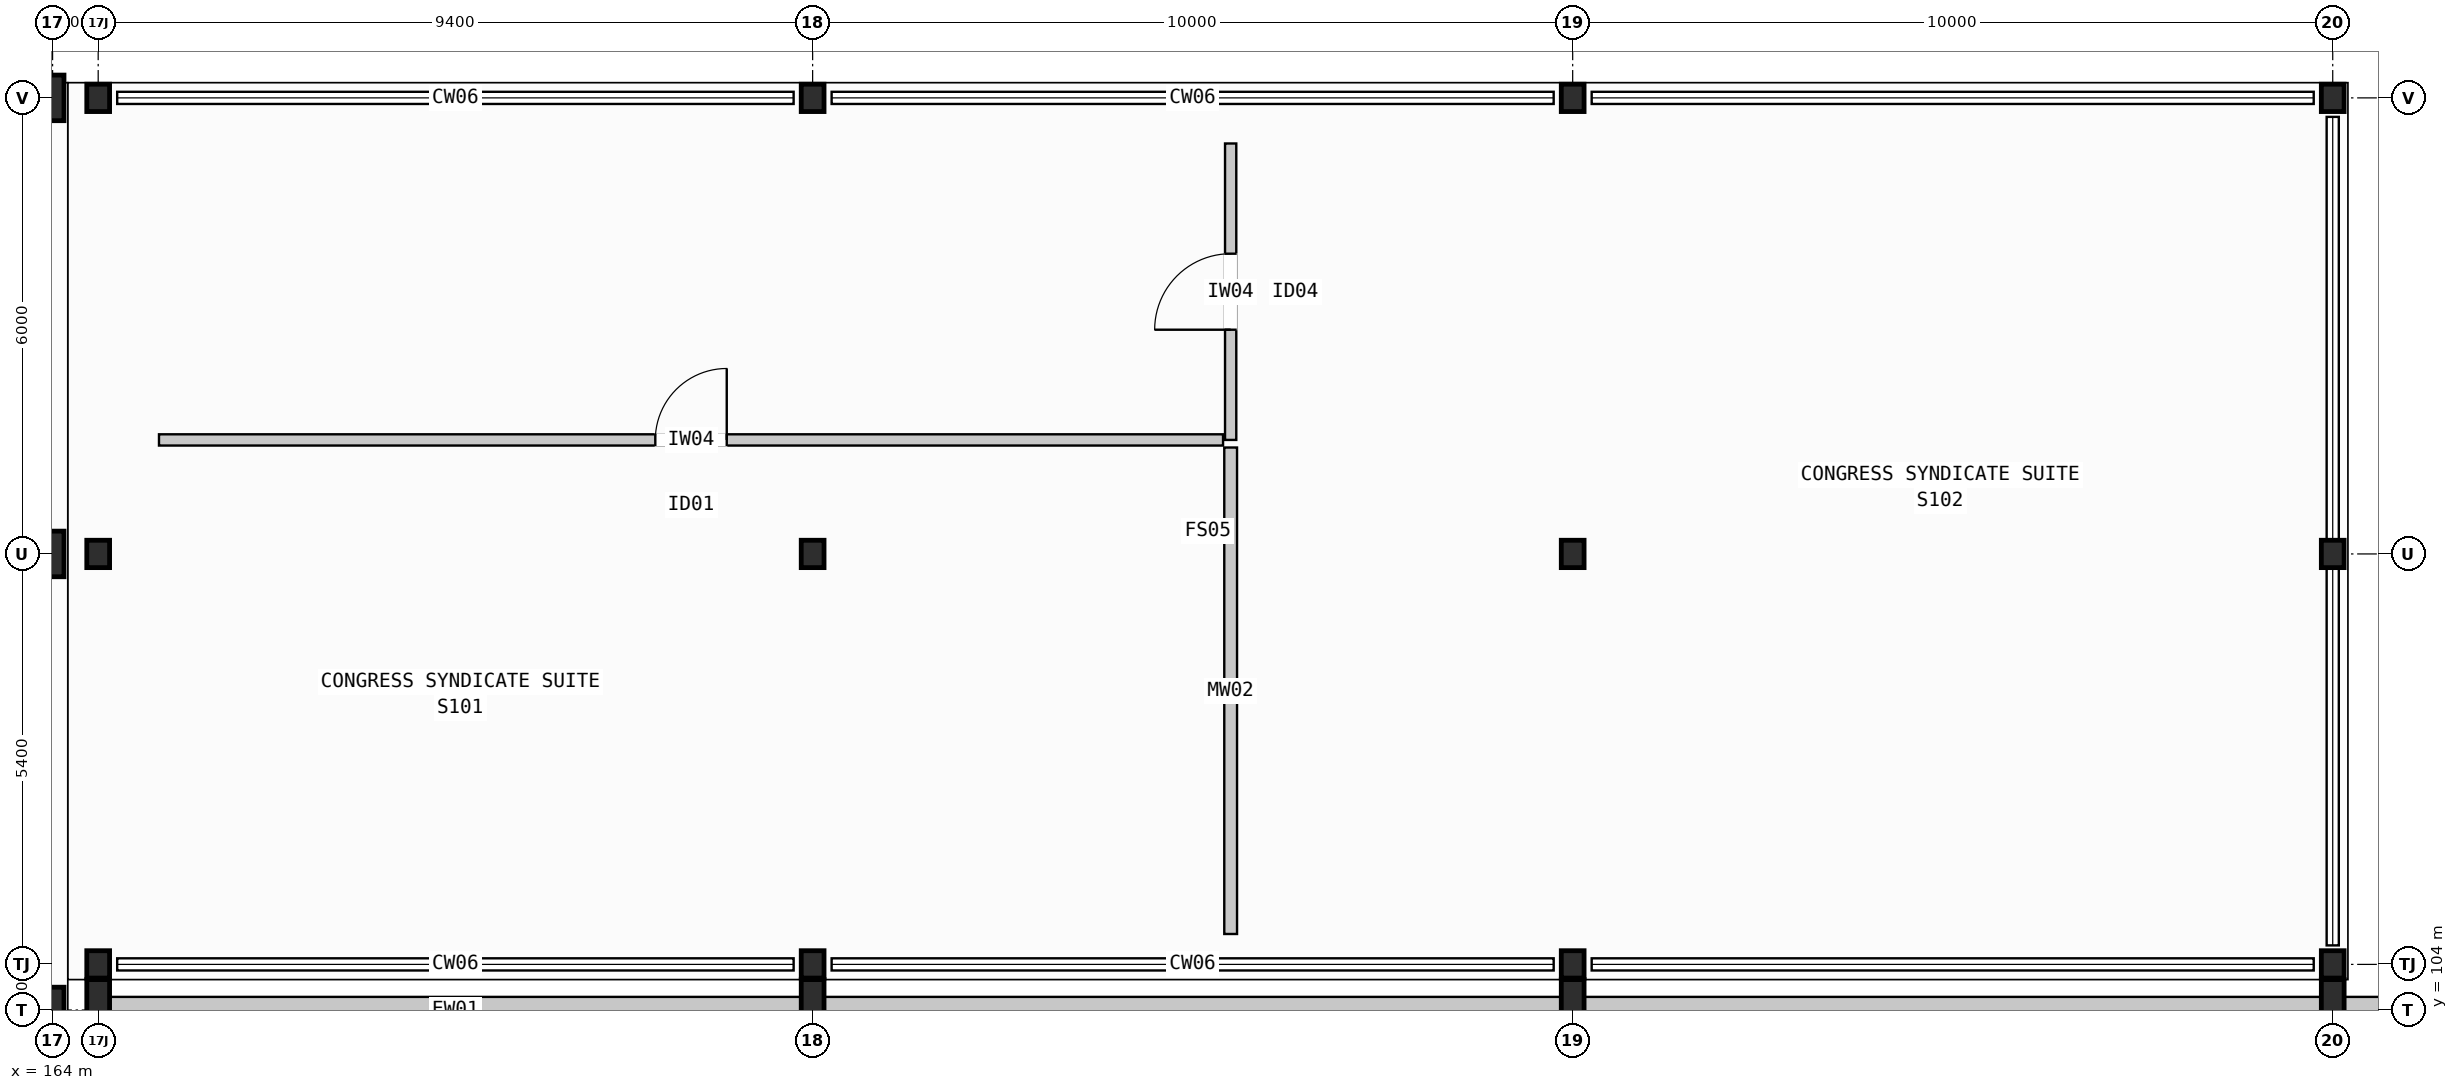
"""IFC4 building model, lengths in metres.
Left out: names, types, materials, properties, quantities, classifications, styles, units other than length and angle.
Written with IfcOpenShell. Run it as: python <this file> out.ifc"""

import sys

from ifc_helpers import new_model, si_unit, direction, frame, frame_2d, origin, origin_2d, place, context, subcontext, project, spatial, rectangle, i_section, extrude, element, fill, save


model = new_model("IFC4")
c1 = context("Model", 3, precision=1e-05, world=origin(), true_north=direction((0.0, 1.0)))
c2 = subcontext(c1, "Body", "Model", "MODEL_VIEW")
j1 = project(units=[si_unit("LENGTHUNIT", "METRE"), si_unit("PLANEANGLEUNIT", "RADIAN")], contexts=[c1])
p1 = place(None, origin())
s1 = spatial("IfcSite", under=j1, at=p1, CompositionType="ELEMENT")
p2 = place(p1, origin())
s2 = spatial("IfcBuilding", under=s1, at=p2, CompositionType="ELEMENT")
p3 = place(p2, frame((0.0, 0.0, 6.0)))
s3 = spatial("IfcBuildingStorey", under=s2, at=p3, CompositionType="ELEMENT", Elevation=6.0)
for number, where, z_axis, x_axis in (
    (1, (164.0, 104.0, 0.0), (0.0, 0.0, 1.0), (1.0, 0.0, 0.0)),
    (2, (164.0, 110.0, 0.0), (0.0, 0.0, 1.0), (1.0, 0.0, 0.0)),
    (3, (164.0, 116.0, 0.0), (0.0, 0.0, 1.0), (1.0, 0.0, 0.0)),
):
    element("IfcColumn", number, at=place(p3, frame(where, z_axis=z_axis, x_axis=x_axis)), inside=s3, PredefinedType="COLUMN", context=c2, shape_type="SweptSolid", body=[
        extrude(i_section(OverallWidth=0.3, OverallDepth=0.6, WebThickness=0.015, FlangeThickness=0.03, FilletRadius=0.027, at=origin_2d()), origin(), (0.0, 0.0, 1.0), 5.4),
    ])
p4 = place(p3, frame((164.6, 104.0, 0.0), z_axis=(0.0, 0.0, 1.0), x_axis=(1.0, 0.0, 0.0)))
e4 = element("IfcColumn", 4, at=p4, inside=s3, PredefinedType="COLUMN", context=c2, shape_type="SweptSolid", body=[
    extrude(i_section(OverallWidth=0.3, OverallDepth=0.8, WebThickness=0.018, FlangeThickness=0.033, FilletRadius=0.03, at=origin_2d()), origin(), (0.0, 0.0, 1.0), 5.4),
])
for number, where, z_axis, x_axis in (
    (5, (164.6, 104.6, 0.0), (0.0, 0.0, 1.0), (1.0, 0.0, 0.0)),
    (6, (164.6, 110.0, 0.0), (0.0, 0.0, 1.0), (1.0, 0.0, 0.0)),
    (7, (164.6, 116.0, 0.0), (0.0, 0.0, 1.0), (1.0, 0.0, 0.0)),
):
    element("IfcColumn", number, at=place(p3, frame(where, z_axis=z_axis, x_axis=x_axis)), inside=s3, PredefinedType="COLUMN", context=c2, shape_type="SweptSolid", body=[
        extrude(i_section(OverallWidth=0.3, OverallDepth=0.36, WebThickness=0.012, FlangeThickness=0.022, FilletRadius=0.027, at=origin_2d()), origin(), (0.0, 0.0, 1.0), 5.4),
    ])
p5 = place(p3, frame((174.0, 104.0, 0.0), z_axis=(0.0, 0.0, 1.0), x_axis=(1.0, 0.0, 0.0)))
e8 = element("IfcColumn", 8, at=p5, inside=s3, PredefinedType="COLUMN", context=c2, shape_type="SweptSolid", body=[
    extrude(i_section(OverallWidth=0.3, OverallDepth=0.8, WebThickness=0.018, FlangeThickness=0.033, FilletRadius=0.03, at=origin_2d()), origin(), (0.0, 0.0, 1.0), 5.4),
])
for number, where, z_axis, x_axis in (
    (9, (174.0, 104.6, 0.0), (0.0, 0.0, 1.0), (1.0, 0.0, 0.0)),
    (10, (174.0, 110.0, 0.0), (0.0, 0.0, 1.0), (1.0, 0.0, 0.0)),
    (11, (174.0, 116.0, 0.0), (0.0, 0.0, 1.0), (1.0, 0.0, 0.0)),
):
    element("IfcColumn", number, at=place(p3, frame(where, z_axis=z_axis, x_axis=x_axis)), inside=s3, PredefinedType="COLUMN", context=c2, shape_type="SweptSolid", body=[
        extrude(i_section(OverallWidth=0.3, OverallDepth=0.36, WebThickness=0.012, FlangeThickness=0.022, FilletRadius=0.027, at=origin_2d()), origin(), (0.0, 0.0, 1.0), 5.4),
    ])
p6 = place(p3, frame((184.0, 104.0, 0.0), z_axis=(0.0, 0.0, 1.0), x_axis=(1.0, 0.0, 0.0)))
e12 = element("IfcColumn", 12, at=p6, inside=s3, PredefinedType="COLUMN", context=c2, shape_type="SweptSolid", body=[
    extrude(i_section(OverallWidth=0.3, OverallDepth=0.8, WebThickness=0.018, FlangeThickness=0.033, FilletRadius=0.03, at=origin_2d()), origin(), (0.0, 0.0, 1.0), 5.4),
])
for number, where, z_axis, x_axis in (
    (13, (184.0, 104.6, 0.0), (0.0, 0.0, 1.0), (1.0, 0.0, 0.0)),
    (14, (184.0, 110.0, 0.0), (0.0, 0.0, 1.0), (1.0, 0.0, 0.0)),
    (15, (184.0, 116.0, 0.0), (0.0, 0.0, 1.0), (1.0, 0.0, 0.0)),
):
    element("IfcColumn", number, at=place(p3, frame(where, z_axis=z_axis, x_axis=x_axis)), inside=s3, PredefinedType="COLUMN", context=c2, shape_type="SweptSolid", body=[
        extrude(i_section(OverallWidth=0.3, OverallDepth=0.36, WebThickness=0.012, FlangeThickness=0.022, FilletRadius=0.027, at=origin_2d()), origin(), (0.0, 0.0, 1.0), 5.4),
    ])
p7 = place(p3, frame((194.0, 104.0, 0.0), z_axis=(0.0, 0.0, 1.0), x_axis=(1.0, 0.0, 0.0)))
e16 = element("IfcColumn", 16, at=p7, inside=s3, PredefinedType="COLUMN", context=c2, shape_type="SweptSolid", body=[
    extrude(i_section(OverallWidth=0.3, OverallDepth=0.8, WebThickness=0.018, FlangeThickness=0.033, FilletRadius=0.03, at=origin_2d()), origin(), (0.0, 0.0, 1.0), 5.4),
])
for number, where, z_axis, x_axis in (
    (17, (194.0, 104.6, 0.0), (0.0, 0.0, 1.0), (1.0, 0.0, 0.0)),
    (18, (194.0, 110.0, 0.0), (0.0, 0.0, 1.0), (1.0, 0.0, 0.0)),
    (19, (194.0, 116.0, 0.0), (0.0, 0.0, 1.0), (1.0, 0.0, 0.0)),
):
    element("IfcColumn", number, at=place(p3, frame(where, z_axis=z_axis, x_axis=x_axis)), inside=s3, PredefinedType="COLUMN", context=c2, shape_type="SweptSolid", body=[
        extrude(i_section(OverallWidth=0.3, OverallDepth=0.36, WebThickness=0.012, FlangeThickness=0.022, FilletRadius=0.027, at=origin_2d()), origin(), (0.0, 0.0, 1.0), 5.4),
    ])
p8 = place(p3, frame((164.746, 104.0, 0.0), z_axis=(0.0, 0.0, 1.0), x_axis=(1.0, 0.0, 0.0)))
e20 = element("IfcWall", 20, at=p8, inside=s3, PredefinedType="STANDARD", context=c2, shape_type="SweptSolid", body=[
    extrude(rectangle(XDim=9.108, YDim=0.345, at=frame_2d((4.554, 0.0))), origin(), (0.0, 0.0, 1.0), 4.6),
])
for number, where, z_axis, x_axis in (
    (21, (174.146, 104.0, 0.0), (0.0, 0.0, 1.0), (1.0, 0.0, 0.0)),
    (22, (184.146, 104.0, 0.0), (0.0, 0.0, 1.0), (1.0, 0.0, 0.0)),
    (23, (194.146, 104.0, 0.0), (0.0, 0.0, 1.0), (1.0, 0.0, 0.0)),
):
    element("IfcWall", number, at=place(p3, frame(where, z_axis=z_axis, x_axis=x_axis)), inside=s3, PredefinedType="STANDARD", context=c2, shape_type="SweptSolid", body=[
        extrude(rectangle(XDim=9.708, YDim=0.345, at=frame_2d((4.854, 0.0))), origin(), (0.0, 0.0, 1.0), 4.6),
    ])
p9 = place(p3, frame((165.4, 111.5, 0.0), z_axis=(0.0, 0.0, 1.0), x_axis=(1.0, 0.0, 0.0)))
e24 = element("IfcWall", 24, at=p9, inside=s3, PredefinedType="PARTITIONING", context=c2, shape_type="SweptSolid", body=[
    extrude(rectangle(XDim=14.0, YDim=0.148, at=frame_2d((7.0, 0.0))), origin(), (0.0, 0.0, 1.0), 4.4),
])
p10 = place(p9, frame((6.53, 0.0, 0.0)))
e25 = element("IfcOpeningElement", 25, at=p10, cuts=e24, PredefinedType="OPENING", context=c2, shape_type="SweptSolid", body=[
    extrude(rectangle(XDim=0.94, YDim=2.12, at=frame_2d((0.47, 1.06))), frame((0.0, 0.084, 0.0), z_axis=(0.0, -1.0, 0.0), x_axis=(1.0, 0.0, 0.0)), (0.0, 0.0, 1.0), 0.168),
])
p11 = place(p3, frame((179.5, 111.5, 0.0), z_axis=(0.0, 0.0, 1.0), x_axis=(0.0, 1.0, 0.0)))
e26 = element("IfcWall", 26, at=p11, inside=s3, PredefinedType="PARTITIONING", context=c2, shape_type="SweptSolid", body=[
    extrude(rectangle(XDim=3.9, YDim=0.148, at=frame_2d((1.95, 0.0))), origin(), (0.0, 0.0, 1.0), 4.4),
])
p12 = place(p11, frame((1.45, 0.0, 0.0)))
e27 = element("IfcOpeningElement", 27, at=p12, cuts=e26, PredefinedType="OPENING", context=c2, shape_type="SweptSolid", body=[
    extrude(rectangle(XDim=1.0, YDim=2.15, at=frame_2d((0.5, 1.075))), frame((0.0, 0.084, 0.0), z_axis=(0.0, -1.0, 0.0), x_axis=(1.0, 0.0, 0.0)), (0.0, 0.0, 1.0), 0.168),
])
p13 = place(p3, frame((179.5, 105.0, 0.0), z_axis=(0.0, 0.0, 1.0), x_axis=(0.0, 1.0, 0.0)))
e28 = element("IfcWall", 28, at=p13, inside=s3, PredefinedType="MOVABLE", context=c2, shape_type="SweptSolid", body=[
    extrude(rectangle(XDim=6.4, YDim=0.168, at=frame_2d((3.2, 0.0))), origin(), (0.0, 0.0, 1.0), 4.4),
])
p14 = place(p10, origin())
e29 = element("IfcDoor", 29, at=p14, inside=s3, OperationType="SINGLE_SWING_RIGHT", PredefinedType="DOOR", context=c2, shape_type="SweptSolid", body=[
    extrude(rectangle(XDim=0.94, YDim=2.12, at=frame_2d((0.47, 1.06))), frame((0.0, 0.025, 0.0), z_axis=(0.0, -1.0, 0.0), x_axis=(1.0, 0.0, 0.0)), (0.0, 0.0, 1.0), 0.05),
])
fill(e25, e29)
p15 = place(p12, origin())
e30 = element("IfcDoor", 30, at=p15, inside=s3, OperationType="SINGLE_SWING_LEFT", PredefinedType="DOOR", context=c2, shape_type="SweptSolid", body=[
    extrude(rectangle(XDim=1.0, YDim=2.15, at=frame_2d((0.5, 1.075))), frame((0.0, 0.025, 0.0), z_axis=(0.0, -1.0, 0.0), x_axis=(1.0, 0.0, 0.0)), (0.0, 0.0, 1.0), 0.05),
])
fill(e27, e30)
save(model, sys.argv[1])
